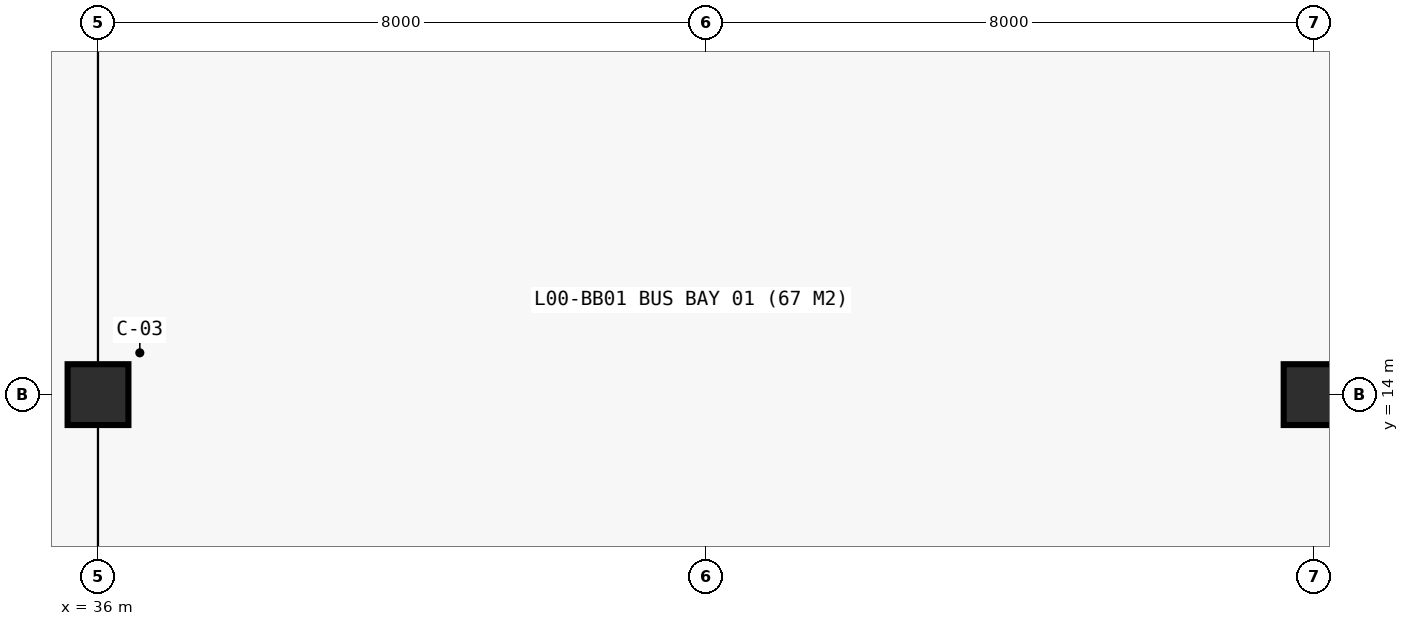
"""IFC4 building model, lengths in metres.
Left out: names, types, materials, properties, quantities, classifications, styles, units other than length and angle.
Written with IfcOpenShell. Run it as: python <this file> out.ifc"""

import sys

from ifc_helpers import new_model, si_unit, direction, frame, frame_2d, origin, origin_2d, place, context, subcontext, project, spatial, rectangle, extrude, element, save


model = new_model("IFC4")
c1 = context("Model", 3, precision=1e-05, world=origin(), true_north=direction((0.0, 1.0)))
c2 = subcontext(c1, "Body", "Model", "MODEL_VIEW")
j1 = project(units=[si_unit("LENGTHUNIT", "METRE"), si_unit("PLANEANGLEUNIT", "RADIAN")], contexts=[c1])
p1 = place(None, origin())
s1 = spatial("IfcSite", under=j1, at=p1, CompositionType="ELEMENT")
p2 = place(p1, origin())
s2 = spatial("IfcBuilding", under=s1, at=p2, CompositionType="ELEMENT")
p3 = place(p2, origin())
s3 = spatial("IfcBuildingStorey", under=s2, at=p3, CompositionType="ELEMENT", Elevation=0.0)
for number, where, z_axis, x_axis in (
    (1, (36.0, 14.0, 0.0), (0.0, 0.0, 1.0), (1.0, 0.0, 0.0)),
    (2, (52.0, 14.0, 0.0), (0.0, 0.0, 1.0), (1.0, 0.0, 0.0)),
):
    element("IfcColumn", number, at=place(p3, frame(where, z_axis=z_axis, x_axis=x_axis)), inside=s3, PredefinedType="COLUMN", context=c2, shape_type="SweptSolid", body=[
        extrude(rectangle(XDim=0.8, YDim=0.8, at=origin_2d()), origin(), (0.0, 0.0, 1.0), 6.6),
    ])
p4 = place(p3, frame((35.547, 6.453, 0.0), z_axis=(0.0, 0.0, 1.0), x_axis=(-0.707106781187, 0.707106781187, 0.0)))
e3 = element("IfcWall", 3, at=p4, inside=s3, PredefinedType="STANDARD", context=c2, shape_type="SweptSolid", body=[
    extrude(rectangle(XDim=10.108, YDim=0.35, at=frame_2d((5.054, 0.0))), origin(), (0.0, 0.0, 1.0), 5.6),
])
p5 = place(p4, frame((4.454, 0.0, 0.95)))
e4 = element("IfcOpeningElement", 4, at=p5, cuts=e3, PredefinedType="OPENING", context=c2, shape_type="SweptSolid", body=[
    extrude(rectangle(XDim=1.2, YDim=2.4, at=frame_2d((0.6, 1.2))), frame((0.0, 0.185, 0.0), z_axis=(0.0, -1.0, 0.0), x_axis=(1.0, 0.0, 0.0)), (0.0, 0.0, 1.0), 0.37),
])
save(model, sys.argv[1])
